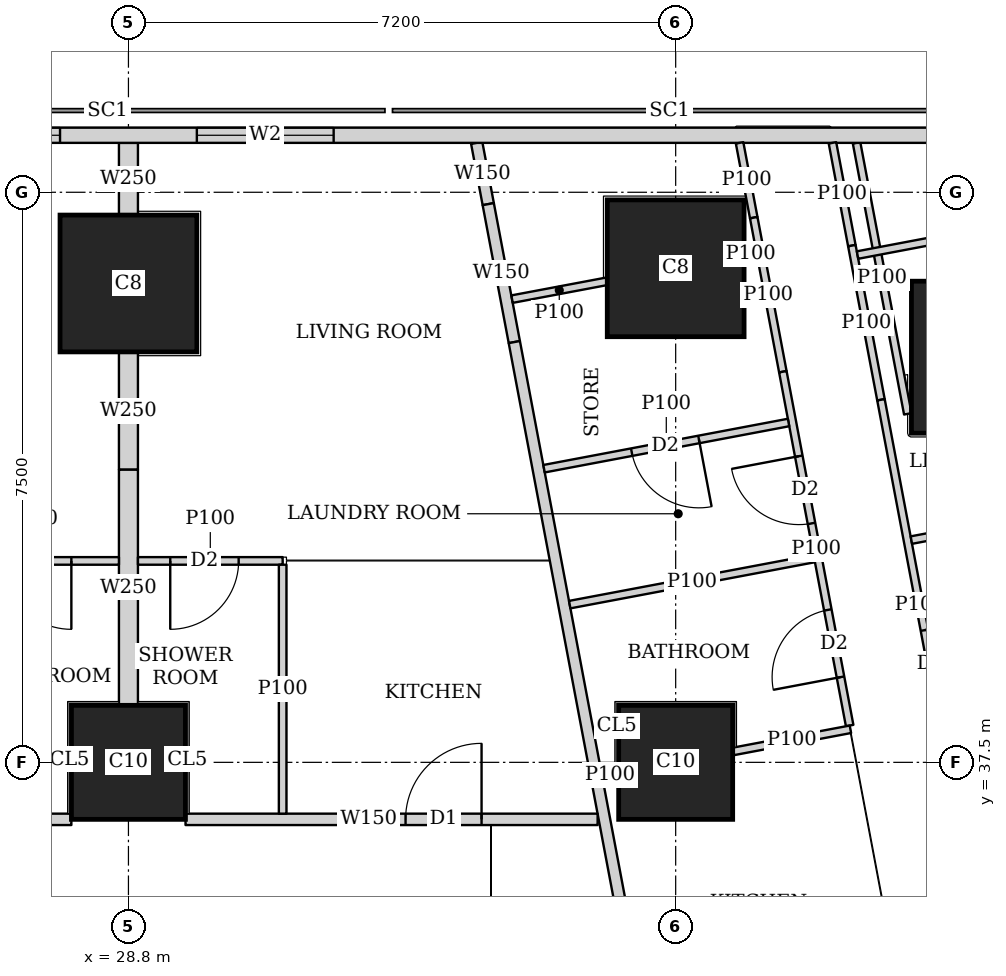
"""IFC4 building model, lengths in metres.
Left out: names, types, materials, properties, quantities, classifications, styles, units other than length and angle.
Written with IfcOpenShell. Run it as: python <this file> out.ifc"""

import sys

from ifc_helpers import new_model, si_unit, direction, frame, frame_2d, origin, origin_2d, place, context, subcontext, project, spatial, rectangle, extrude, element, fill, save


model = new_model("IFC4")
c1 = context("Model", 3, precision=1e-05, world=origin(), true_north=direction((0.0, 1.0)))
c2 = subcontext(c1, "Body", "Model", "MODEL_VIEW")
j1 = project(units=[si_unit("LENGTHUNIT", "METRE"), si_unit("PLANEANGLEUNIT", "RADIAN")], contexts=[c1])
p1 = place(None, origin())
s1 = spatial("IfcSite", under=j1, at=p1, CompositionType="ELEMENT")
p2 = place(p1, origin())
s2 = spatial("IfcBuilding", under=s1, at=p2, CompositionType="ELEMENT")
p3 = place(p2, frame((0.0, 0.0, 169.55)))
s3 = spatial("IfcBuildingStorey", under=s2, at=p3, CompositionType="ELEMENT", Elevation=169.55)
for number, where, z_axis, x_axis in (
    (1, (28.8, 37.5, 0.0), (0.0, 0.0, 1.0), (1.0, 0.0, 0.0)),
    (2, (36.0, 37.5, 0.0), (0.0, 0.0, 1.0), (1.0, 0.0, 0.0)),
):
    element("IfcColumn", number, at=place(p3, frame(where, z_axis=z_axis, x_axis=x_axis)), inside=s3, PredefinedType="COLUMN", context=c2, shape_type="SweptSolid", body=[
        extrude(rectangle(XDim=1.5, YDim=1.5, at=origin_2d()), origin(), (0.0, 0.0, 1.0), 3.75),
    ])
p4 = place(p3, frame((40.102, 42.83, 0.0), z_axis=(0.0, 0.0, 1.0), x_axis=(1.0, 0.0, 0.0)))
e3 = element("IfcColumn", 3, at=p4, inside=s3, PredefinedType="COLUMN", context=c2, shape_type="SweptSolid", body=[
    extrude(rectangle(XDim=2.0, YDim=2.0, at=origin_2d()), origin(), (0.0, 0.0, 1.0), 3.75),
])
for number, where, z_axis, x_axis in (
    (4, (28.8, 43.8, 0.0), (0.0, 0.0, 1.0), (1.0, 0.0, 0.0)),
    (5, (36.0, 44.0, 0.0), (0.0, 0.0, 1.0), (1.0, 0.0, 0.0)),
):
    element("IfcColumn", number, at=place(p3, frame(where, z_axis=z_axis, x_axis=x_axis)), inside=s3, PredefinedType="COLUMN", context=c2, shape_type="SweptSolid", body=[
        extrude(rectangle(XDim=1.8, YDim=1.8, at=origin_2d()), origin(), (0.0, 0.0, 1.0), 3.75),
    ])
p5 = place(p3, frame((40.106, 45.75, 0.0), z_axis=(0.0, 0.0, 1.0), x_axis=(-1.0, 0.0, 0.0)))
e6 = element("IfcWall", 6, at=p5, inside=s3, PredefinedType="SOLIDWALL", context=c2, shape_type="SweptSolid", body=[
    extrude(rectangle(XDim=37.943, YDim=0.2, at=frame_2d((18.971, 0.0))), origin(), (0.0, 0.0, 1.0), 3.5),
])
p6 = place(p5, frame((8.606, 0.0, 0.9)))
e7 = element("IfcOpeningElement", 7, at=p6, cuts=e6, PredefinedType="OPENING", context=c2, shape_type="SweptSolid", body=[
    extrude(rectangle(XDim=1.8, YDim=1.5, at=frame_2d((0.9, 0.75))), frame((0.0, 0.11, 0.0), z_axis=(0.0, -1.0, 0.0), x_axis=(1.0, 0.0, 0.0)), (0.0, 0.0, 1.0), 0.22),
])
p7 = place(p5, frame((12.206, 0.0, 0.9)))
e8 = element("IfcOpeningElement", 8, at=p7, cuts=e6, PredefinedType="OPENING", context=c2, shape_type="SweptSolid", body=[
    extrude(rectangle(XDim=1.8, YDim=1.5, at=frame_2d((0.9, 0.75))), frame((0.0, 0.11, 0.0), z_axis=(0.0, -1.0, 0.0), x_axis=(1.0, 0.0, 0.0)), (0.0, 0.0, 1.0), 0.22),
])
p8 = place(p5, frame((15.806, 0.0, 0.9)))
e9 = element("IfcOpeningElement", 9, at=p8, cuts=e6, PredefinedType="OPENING", context=c2, shape_type="SweptSolid", body=[
    extrude(rectangle(XDim=1.8, YDim=1.5, at=frame_2d((0.9, 0.75))), frame((0.0, 0.11, 0.0), z_axis=(0.0, -1.0, 0.0), x_axis=(1.0, 0.0, 0.0)), (0.0, 0.0, 1.0), 0.22),
])
p9 = place(p5, frame((19.406, 0.0, 0.9)))
e10 = element("IfcOpeningElement", 10, at=p9, cuts=e6, PredefinedType="OPENING", context=c2, shape_type="SweptSolid", body=[
    extrude(rectangle(XDim=1.8, YDim=1.5, at=frame_2d((0.9, 0.75))), frame((0.0, 0.11, 0.0), z_axis=(0.0, -1.0, 0.0), x_axis=(1.0, 0.0, 0.0)), (0.0, 0.0, 1.0), 0.22),
])
p10 = place(p5, frame((23.006, 0.0, 0.9)))
e11 = element("IfcOpeningElement", 11, at=p10, cuts=e6, PredefinedType="OPENING", context=c2, shape_type="SweptSolid", body=[
    extrude(rectangle(XDim=1.8, YDim=1.5, at=frame_2d((0.9, 0.75))), frame((0.0, 0.11, 0.0), z_axis=(0.0, -1.0, 0.0), x_axis=(1.0, 0.0, 0.0)), (0.0, 0.0, 1.0), 0.22),
])
p11 = place(p5, frame((26.606, 0.0, 0.9)))
e12 = element("IfcOpeningElement", 12, at=p11, cuts=e6, PredefinedType="OPENING", context=c2, shape_type="SweptSolid", body=[
    extrude(rectangle(XDim=1.8, YDim=1.5, at=frame_2d((0.9, 0.75))), frame((0.0, 0.11, 0.0), z_axis=(0.0, -1.0, 0.0), x_axis=(1.0, 0.0, 0.0)), (0.0, 0.0, 1.0), 0.22),
])
p12 = place(p3, frame((22.351, 36.75, 0.0), z_axis=(0.0, 0.0, 1.0), x_axis=(1.0, 0.0, 0.0)))
e13 = element("IfcWall", 13, at=p12, inside=s3, PredefinedType="SOLIDWALL", context=c2, shape_type="SweptSolid", body=[
    extrude(rectangle(XDim=5.698, YDim=0.15, at=frame_2d((2.849, 0.0))), origin(), (0.0, 0.0, 1.0), 3.5),
])
p13 = place(p12, frame((1.149, 0.0, 0.0)))
e14 = element("IfcOpeningElement", 14, at=p13, cuts=e13, PredefinedType="OPENING", context=c2, shape_type="SweptSolid", body=[
    extrude(rectangle(XDim=1.0, YDim=2.1, at=frame_2d((0.5, 1.05))), frame((0.0, 0.085, 0.0), z_axis=(0.0, -1.0, 0.0), x_axis=(1.0, 0.0, 0.0)), (0.0, 0.0, 1.0), 0.17),
])
p14 = place(p3, frame((29.551, 36.75, 0.0), z_axis=(0.0, 0.0, 1.0), x_axis=(1.0, 0.0, 0.0)))
e15 = element("IfcWall", 15, at=p14, inside=s3, PredefinedType="SOLIDWALL", context=c2, shape_type="SweptSolid", body=[
    extrude(rectangle(XDim=5.422, YDim=0.15, at=frame_2d((2.711, 0.0))), origin(), (0.0, 0.0, 1.0), 3.5),
])
p15 = place(p14, frame((2.895, 0.0, 0.0)))
e16 = element("IfcOpeningElement", 16, at=p15, cuts=e15, PredefinedType="OPENING", context=c2, shape_type="SweptSolid", body=[
    extrude(rectangle(XDim=1.0, YDim=2.1, at=frame_2d((0.5, 1.05))), frame((0.0, 0.085, 0.0), z_axis=(0.0, -1.0, 0.0), x_axis=(1.0, 0.0, 0.0)), (0.0, 0.0, 1.0), 0.17),
])
p16 = place(p3, frame((33.382, 45.65, 0.0), z_axis=(0.0, 0.0, 1.0), x_axis=(0.185169202764, -0.982706653253, 0.0)))
e17 = element("IfcWall", 17, at=p16, inside=s3, PredefinedType="SOLIDWALL", context=c2, shape_type="SweptSolid", body=[
    extrude(rectangle(XDim=0.82, YDim=0.15, at=frame_2d((0.41, 0.0))), origin(), (0.0, 0.0, 1.0), 3.5),
])
p17 = place(p3, frame((33.534, 44.844, 0.0), z_axis=(0.0, 0.0, 1.0), x_axis=(0.185708872674, -0.982604811005, 0.0)))
e18 = element("IfcWall", 18, at=p17, inside=s3, PredefinedType="SOLIDWALL", context=c2, shape_type="SweptSolid", body=[
    extrude(rectangle(XDim=1.847, YDim=0.15, at=frame_2d((0.924, 0.0))), origin(), (0.0, 0.0, 1.0), 2.1),
])
p18 = place(p3, frame((33.877, 43.029, 0.0), z_axis=(0.0, 0.0, 1.0), x_axis=(0.185596841028, -0.98262597798, 0.0)))
e19 = element("IfcWall", 19, at=p18, inside=s3, PredefinedType="SOLIDWALL", context=c2, shape_type="SweptSolid", body=[
    extrude(rectangle(XDim=41.66, YDim=0.15, at=frame_2d((20.83, 0.0))), origin(), (0.0, 0.0, 1.0), 2.5),
])
p19 = place(p18, frame((8.63, 0.0, 0.0)))
e20 = element("IfcOpeningElement", 20, at=p19, cuts=e19, PredefinedType="OPENING", context=c2, shape_type="SweptSolid", body=[
    extrude(rectangle(XDim=1.0, YDim=2.1, at=frame_2d((0.5, 1.05))), frame((0.0, 0.085, 0.0), z_axis=(0.0, -1.0, 0.0), x_axis=(1.0, 0.0, 0.0)), (0.0, 0.0, 1.0), 0.17),
])
p20 = place(p18, frame((13.841, 0.0, 0.0)))
e21 = element("IfcOpeningElement", 21, at=p20, cuts=e19, PredefinedType="OPENING", context=c2, shape_type="SweptSolid", body=[
    extrude(rectangle(XDim=1.0, YDim=2.1, at=frame_2d((0.5, 1.05))), frame((0.0, 0.085, 0.0), z_axis=(0.0, -1.0, 0.0), x_axis=(1.0, 0.0, 0.0)), (0.0, 0.0, 1.0), 0.17),
])
p21 = place(p18, frame((21.474, 0.0, 0.0)))
e22 = element("IfcOpeningElement", 22, at=p21, cuts=e19, PredefinedType="OPENING", context=c2, shape_type="SweptSolid", body=[
    extrude(rectangle(XDim=1.0, YDim=2.1, at=frame_2d((0.5, 1.05))), frame((0.0, 0.085, 0.0), z_axis=(0.0, -1.0, 0.0), x_axis=(1.0, 0.0, 0.0)), (0.0, 0.0, 1.0), 0.17),
])
p22 = place(p18, frame((30.4, 0.0, 0.0)))
e23 = element("IfcOpeningElement", 23, at=p22, cuts=e19, PredefinedType="OPENING", context=c2, shape_type="SweptSolid", body=[
    extrude(rectangle(XDim=1.0, YDim=2.1, at=frame_2d((0.5, 1.05))), frame((0.0, 0.085, 0.0), z_axis=(0.0, -1.0, 0.0), x_axis=(1.0, 0.0, 0.0)), (0.0, 0.0, 1.0), 0.17),
])
p23 = place(p18, frame((32.288, 0.0, 0.0)))
e24 = element("IfcOpeningElement", 24, at=p23, cuts=e19, PredefinedType="OPENING", context=c2, shape_type="SweptSolid", body=[
    extrude(rectangle(XDim=1.0, YDim=2.1, at=frame_2d((0.5, 1.05))), frame((0.0, 0.085, 0.0), z_axis=(0.0, -1.0, 0.0), x_axis=(1.0, 0.0, 0.0)), (0.0, 0.0, 1.0), 0.17),
])
p24 = place(p3, frame((39.054, 42.085, 0.0), z_axis=(0.0, 0.0, 1.0), x_axis=(-0.185791584218, 0.982589175207, 0.0)))
e25 = element("IfcWall", 25, at=p24, inside=s3, PredefinedType="PARTITIONING", context=c2, shape_type="SweptSolid", body=[
    extrude(rectangle(XDim=3.628, YDim=0.1, at=frame_2d((1.814, 0.0))), origin(), (0.0, 0.0, 1.0), 2.1),
])
p25 = place(p3, frame((38.063, 45.65, 0.0), z_axis=(0.0, 0.0, 1.0), x_axis=(0.185456359766, -0.982652501458, 0.0)))
e26 = element("IfcWall", 26, at=p25, inside=s3, PredefinedType="PARTITIONING", context=c2, shape_type="SweptSolid", body=[
    extrude(rectangle(XDim=1.376, YDim=0.1, at=frame_2d((0.688, 0.0))), origin(), (0.0, 0.0, 1.0), 3.5),
])
p26 = place(p3, frame((38.318, 44.298, 0.0), z_axis=(0.0, 0.0, 1.0), x_axis=(0.185481135188, -0.982647825261, 0.0)))
e27 = element("IfcWall", 27, at=p26, inside=s3, PredefinedType="PARTITIONING", context=c2, shape_type="SweptSolid", body=[
    extrude(rectangle(XDim=2.064, YDim=0.1, at=frame_2d((1.032, 0.0))), origin(), (0.0, 0.0, 1.0), 2.1),
])
p27 = place(p3, frame((38.701, 42.27, 0.0), z_axis=(0.0, 0.0, 1.0), x_axis=(0.185474244877, -0.982649125826, 0.0)))
e28 = element("IfcWall", 28, at=p27, inside=s3, PredefinedType="PARTITIONING", context=c2, shape_type="SweptSolid", body=[
    extrude(rectangle(XDim=5.494, YDim=0.1, at=frame_2d((2.747, 0.0))), origin(), (0.0, 0.0, 1.0), 3.5),
])
p28 = place(p27, frame((3.085, 0.0, 0.0)))
e29 = element("IfcOpeningElement", 29, at=p28, cuts=e28, PredefinedType="OPENING", context=c2, shape_type="SweptSolid", body=[
    extrude(rectangle(XDim=0.9, YDim=2.1, at=frame_2d((0.45, 1.05))), frame((0.0, 0.06, 0.0), z_axis=(0.0, -1.0, 0.0), x_axis=(1.0, 0.0, 0.0)), (0.0, 0.0, 1.0), 0.12),
])
p29 = place(p3, frame((36.841, 45.65, 0.0), z_axis=(0.0, 0.0, 1.0), x_axis=(0.185789875365, -0.982589498322, 0.0)))
e30 = element("IfcWall", 30, at=p29, inside=s3, PredefinedType="PARTITIONING", context=c2, shape_type="SweptSolid", body=[
    extrude(rectangle(XDim=1.001, YDim=0.1, at=frame_2d((0.5, 0.0))), origin(), (0.0, 0.0, 1.0), 3.5),
])
p30 = place(p3, frame((37.027, 44.666, 0.0), z_axis=(0.0, 0.0, 1.0), x_axis=(0.1855674151, -0.982631535446, 0.0)))
e31 = element("IfcWall", 31, at=p30, inside=s3, PredefinedType="PARTITIONING", context=c2, shape_type="SweptSolid", body=[
    extrude(rectangle(XDim=2.063, YDim=0.1, at=frame_2d((1.031, 0.0))), origin(), (0.0, 0.0, 1.0), 2.1),
])
p31 = place(p3, frame((37.41, 42.639, 0.0), z_axis=(0.0, 0.0, 1.0), x_axis=(0.185579683022, -0.982629218601, 0.0)))
e32 = element("IfcWall", 32, at=p31, inside=s3, PredefinedType="PARTITIONING", context=c2, shape_type="SweptSolid", body=[
    extrude(rectangle(XDim=4.737, YDim=0.1, at=frame_2d((2.369, 0.0))), origin(), (0.0, 0.0, 1.0), 3.5),
])
p32 = place(p31, frame((3.189, 0.0, 0.0)))
e33 = element("IfcOpeningElement", 33, at=p32, cuts=e32, PredefinedType="OPENING", context=c2, shape_type="SweptSolid", body=[
    extrude(rectangle(XDim=0.9, YDim=2.1, at=frame_2d((0.45, 1.05))), frame((0.0, 0.06, 0.0), z_axis=(0.0, -1.0, 0.0), x_axis=(1.0, 0.0, 0.0)), (0.0, 0.0, 1.0), 0.12),
])
p33 = place(p31, frame((1.131, 0.0, 0.0)))
e34 = element("IfcOpeningElement", 34, at=p33, cuts=e32, PredefinedType="OPENING", context=c2, shape_type="SweptSolid", body=[
    extrude(rectangle(XDim=0.9, YDim=2.1, at=frame_2d((0.45, 1.05))), frame((0.0, 0.06, 0.0), z_axis=(0.0, -1.0, 0.0), x_axis=(1.0, 0.0, 0.0)), (0.0, 0.0, 1.0), 0.12),
])
p34 = place(p3, frame((41.968, 44.85, 0.0), z_axis=(0.0, 0.0, 1.0), x_axis=(-0.98258614234, -0.185807623311, 0.0)))
e35 = element("IfcWall", 35, at=p34, inside=s3, PredefinedType="PARTITIONING", context=c2, shape_type="SweptSolid", body=[
    extrude(rectangle(XDim=3.638, YDim=0.1, at=frame_2d((1.819, 0.0))), origin(), (0.0, 0.0, 1.0), 2.1),
])
p35 = place(p3, frame((43.277, 41.212, 0.0), z_axis=(0.0, 0.0, 1.0), x_axis=(-0.982665405803, -0.185387972203, 0.0)))
e36 = element("IfcWall", 36, at=p35, inside=s3, PredefinedType="PARTITIONING", context=c2, shape_type="SweptSolid", body=[
    extrude(rectangle(XDim=4.25, YDim=0.1, at=frame_2d((2.125, 0.0))), origin(), (0.0, 0.0, 1.0), 2.1),
])
p36 = place(p3, frame((37.064, 44.201, 0.0), z_axis=(0.0, 0.0, 1.0), x_axis=(-0.982960250751, -0.183818240236, 0.0)))
e37 = element("IfcWall", 37, at=p36, inside=s3, PredefinedType="PARTITIONING", context=c2, shape_type="SweptSolid", body=[
    extrude(rectangle(XDim=0.157, YDim=0.1, at=frame_2d((0.078, 0.0))), origin(), (0.0, 0.0, 1.0), 2.1),
])
p37 = place(p3, frame((35.09, 43.828, 0.0), z_axis=(0.0, 0.0, 1.0), x_axis=(-0.982758384778, -0.184894448668, 0.0)))
e38 = element("IfcWall", 38, at=p37, inside=s3, PredefinedType="PARTITIONING", context=c2, shape_type="SweptSolid", body=[
    extrude(rectangle(XDim=1.265, YDim=0.1, at=frame_2d((0.632, 0.0))), origin(), (0.0, 0.0, 1.0), 2.1),
])
p38 = place(p3, frame((37.823, 40.182, 0.0), z_axis=(0.0, 0.0, 1.0), x_axis=(-0.982664729897, -0.18539155487, 0.0)))
e39 = element("IfcWall", 39, at=p38, inside=s3, PredefinedType="PARTITIONING", context=c2, shape_type="SweptSolid", body=[
    extrude(rectangle(XDim=3.274, YDim=0.1, at=frame_2d((1.637, 0.0))), origin(), (0.0, 0.0, 1.0), 3.5),
])
p39 = place(p3, frame((38.299, 37.935, 0.0), z_axis=(0.0, 0.0, 1.0), x_axis=(-0.98258870752, -0.18579405764, 0.0)))
e40 = element("IfcWall", 40, at=p39, inside=s3, PredefinedType="PARTITIONING", context=c2, shape_type="SweptSolid", body=[
    extrude(rectangle(XDim=1.566, YDim=0.1, at=frame_2d((0.783, 0.0))), origin(), (0.0, 0.0, 1.0), 3.5),
])
p40 = place(p3, frame((35.24, 37.356, 0.0), z_axis=(0.0, 0.0, 1.0), x_axis=(-0.982819911474, -0.184567119526, 0.0)))
e41 = element("IfcWall", 41, at=p40, inside=s3, PredefinedType="PARTITIONING", context=c2, shape_type="SweptSolid", body=[
    extrude(rectangle(XDim=0.212, YDim=0.1, at=frame_2d((0.106, 0.0))), origin(), (0.0, 0.0, 1.0), 3.5),
])
p41 = place(p3, frame((37.485, 41.971, 0.0), z_axis=(0.0, 0.0, 1.0), x_axis=(-0.982610347627, -0.185679575441, 0.0)))
e42 = element("IfcWall", 42, at=p41, inside=s3, PredefinedType="PARTITIONING", context=c2, shape_type="SweptSolid", body=[
    extrude(rectangle(XDim=3.274, YDim=0.1, at=frame_2d((1.637, 0.0))), origin(), (0.0, 0.0, 1.0), 3.5),
])
p42 = place(p41, frame((1.2, 0.0, 0.0)))
e43 = element("IfcOpeningElement", 43, at=p42, cuts=e42, PredefinedType="OPENING", context=c2, shape_type="SweptSolid", body=[
    extrude(rectangle(XDim=0.9, YDim=2.1, at=frame_2d((0.45, 1.05))), frame((0.0, 0.06, 0.0), z_axis=(0.0, -1.0, 0.0), x_axis=(1.0, 0.0, 0.0)), (0.0, 0.0, 1.0), 0.12),
])
p43 = place(p3, frame((26.399, 40.15, 0.0), z_axis=(0.0, 0.0, 1.0), x_axis=(1.0, 0.0, 0.0)))
e44 = element("IfcWall", 44, at=p43, inside=s3, PredefinedType="PARTITIONING", context=c2, shape_type="SweptSolid", body=[
    extrude(rectangle(XDim=2.276, YDim=0.1, at=frame_2d((1.138, 0.0))), origin(), (0.0, 0.0, 1.0), 3.5),
])
p44 = place(p43, frame((0.75, 0.0, 0.0)))
e45 = element("IfcOpeningElement", 45, at=p44, cuts=e44, PredefinedType="OPENING", context=c2, shape_type="SweptSolid", body=[
    extrude(rectangle(XDim=0.9, YDim=2.1, at=frame_2d((0.45, 1.05))), frame((0.0, 0.06, 0.0), z_axis=(0.0, -1.0, 0.0), x_axis=(1.0, 0.0, 0.0)), (0.0, 0.0, 1.0), 0.12),
])
p45 = place(p3, frame((28.925, 40.15, 0.0), z_axis=(0.0, 0.0, 1.0), x_axis=(1.0, 0.0, 0.0)))
e46 = element("IfcWall", 46, at=p45, inside=s3, PredefinedType="PARTITIONING", context=c2, shape_type="SweptSolid", body=[
    extrude(rectangle(XDim=1.904, YDim=0.1, at=frame_2d((0.952, 0.0))), origin(), (0.0, 0.0, 1.0), 3.5),
])
p46 = place(p45, frame((0.425, 0.0, 0.0)))
e47 = element("IfcOpeningElement", 47, at=p46, cuts=e46, PredefinedType="OPENING", context=c2, shape_type="SweptSolid", body=[
    extrude(rectangle(XDim=0.9, YDim=2.1, at=frame_2d((0.45, 1.05))), frame((0.0, 0.06, 0.0), z_axis=(0.0, -1.0, 0.0), x_axis=(1.0, 0.0, 0.0)), (0.0, 0.0, 1.0), 0.12),
])
p47 = place(p3, frame((30.829, 36.825, 0.0), z_axis=(0.0, 0.0, 1.0), x_axis=(0.0, 1.0, 0.0)))
e48 = element("IfcWall", 48, at=p47, inside=s3, PredefinedType="PARTITIONING", context=c2, shape_type="SweptSolid", body=[
    extrude(rectangle(XDim=3.275, YDim=0.1, at=frame_2d((1.638, 0.0))), origin(), (0.0, 0.0, 1.0), 3.5),
])
p48 = place(p3, frame((28.8, 41.35, 0.0), z_axis=(0.0, 0.0, 1.0), x_axis=(0.0, 1.0, 0.0)))
e49 = element("IfcWall", 49, at=p48, inside=s3, PredefinedType="SOLIDWALL", context=c2, shape_type="SweptSolid", body=[
    extrude(rectangle(XDim=1.549, YDim=0.25, at=frame_2d((0.774, 0.0))), origin(), (0.0, 0.0, 1.0), 2.1),
])
p49 = place(p3, frame((28.8, 44.701, 0.0), z_axis=(0.0, 0.0, 1.0), x_axis=(0.0, 1.0, 0.0)))
e50 = element("IfcWall", 50, at=p49, inside=s3, PredefinedType="SOLIDWALL", context=c2, shape_type="SweptSolid", body=[
    extrude(rectangle(XDim=0.949, YDim=0.25, at=frame_2d((0.475, 0.0))), origin(), (0.0, 0.0, 1.0), 2.1),
])
p50 = place(p3, frame((28.8, 38.251, 0.0), z_axis=(0.0, 0.0, 1.0), x_axis=(0.0, 1.0, 0.0)))
e51 = element("IfcWall", 51, at=p50, inside=s3, PredefinedType="SOLIDWALL", context=c2, shape_type="SweptSolid", body=[
    extrude(rectangle(XDim=3.099, YDim=0.25, at=frame_2d((1.55, 0.0))), origin(), (0.0, 0.0, 1.0), 3.5),
])
p51 = place(p6, origin())
e52 = element("IfcWindow", 52, at=p51, inside=s3, PartitioningType="SINGLE_PANEL", PredefinedType="WINDOW", context=c2, shape_type="SweptSolid", body=[
    extrude(rectangle(XDim=1.8, YDim=1.5, at=frame_2d((0.9, 0.75))), frame((0.0, 0.03, 0.0), z_axis=(0.0, -1.0, 0.0), x_axis=(1.0, 0.0, 0.0)), (0.0, 0.0, 1.0), 0.06),
])
fill(e7, e52)
p52 = place(p7, origin())
e53 = element("IfcWindow", 53, at=p52, inside=s3, PartitioningType="SINGLE_PANEL", PredefinedType="WINDOW", context=c2, shape_type="SweptSolid", body=[
    extrude(rectangle(XDim=1.8, YDim=1.5, at=frame_2d((0.9, 0.75))), frame((0.0, 0.03, 0.0), z_axis=(0.0, -1.0, 0.0), x_axis=(1.0, 0.0, 0.0)), (0.0, 0.0, 1.0), 0.06),
])
fill(e8, e53)
p53 = place(p28, origin())
e54 = element("IfcDoor", 54, at=p53, inside=s3, OperationType="SINGLE_SWING_LEFT", PredefinedType="DOOR", context=c2, shape_type="SweptSolid", body=[
    extrude(rectangle(XDim=0.9, YDim=2.1, at=frame_2d((0.45, 1.05))), frame((0.0, 0.025, 0.0), z_axis=(0.0, -1.0, 0.0), x_axis=(1.0, 0.0, 0.0)), (0.0, 0.0, 1.0), 0.05),
])
fill(e29, e54)
p54 = place(p32, origin())
e55 = element("IfcDoor", 55, at=p54, inside=s3, OperationType="SINGLE_SWING_LEFT", PredefinedType="DOOR", context=c2, shape_type="SweptSolid", body=[
    extrude(rectangle(XDim=0.9, YDim=2.1, at=frame_2d((0.45, 1.05))), frame((0.0, 0.025, 0.0), z_axis=(0.0, -1.0, 0.0), x_axis=(1.0, 0.0, 0.0)), (0.0, 0.0, 1.0), 0.05),
])
fill(e33, e55)
p55 = place(p33, origin())
e56 = element("IfcDoor", 56, at=p55, inside=s3, OperationType="SINGLE_SWING_RIGHT", PredefinedType="DOOR", context=c2, shape_type="SweptSolid", body=[
    extrude(rectangle(XDim=0.9, YDim=2.1, at=frame_2d((0.45, 1.05))), frame((0.0, 0.025, 0.0), z_axis=(0.0, -1.0, 0.0), x_axis=(1.0, 0.0, 0.0)), (0.0, 0.0, 1.0), 0.05),
])
fill(e34, e56)
p56 = place(p42, origin())
e57 = element("IfcDoor", 57, at=p56, inside=s3, OperationType="SINGLE_SWING_LEFT", PredefinedType="DOOR", context=c2, shape_type="SweptSolid", body=[
    extrude(rectangle(XDim=0.9, YDim=2.1, at=frame_2d((0.45, 1.05))), frame((0.0, 0.025, 0.0), z_axis=(0.0, -1.0, 0.0), x_axis=(1.0, 0.0, 0.0)), (0.0, 0.0, 1.0), 0.05),
])
fill(e43, e57)
p57 = place(p44, origin())
e58 = element("IfcDoor", 58, at=p57, inside=s3, OperationType="SINGLE_SWING_LEFT", PredefinedType="DOOR", context=c2, shape_type="SweptSolid", body=[
    extrude(rectangle(XDim=0.9, YDim=2.1, at=frame_2d((0.45, 1.05))), frame((0.0, 0.025, 0.0), z_axis=(0.0, -1.0, 0.0), x_axis=(1.0, 0.0, 0.0)), (0.0, 0.0, 1.0), 0.05),
])
fill(e45, e58)
p58 = place(p46, origin())
e59 = element("IfcDoor", 59, at=p58, inside=s3, OperationType="SINGLE_SWING_RIGHT", PredefinedType="DOOR", context=c2, shape_type="SweptSolid", body=[
    extrude(rectangle(XDim=0.9, YDim=2.1, at=frame_2d((0.45, 1.05))), frame((0.0, 0.025, 0.0), z_axis=(0.0, -1.0, 0.0), x_axis=(1.0, 0.0, 0.0)), (0.0, 0.0, 1.0), 0.05),
])
fill(e47, e59)
p59 = place(p15, origin())
e60 = element("IfcDoor", 60, at=p59, inside=s3, OperationType="SINGLE_SWING_RIGHT", PredefinedType="DOOR", context=c2, shape_type="SweptSolid", body=[
    extrude(rectangle(XDim=1.0, YDim=2.1, at=frame_2d((0.5, 1.05))), frame((0.0, 0.025, 0.0), z_axis=(0.0, -1.0, 0.0), x_axis=(1.0, 0.0, 0.0)), (0.0, 0.0, 1.0), 0.05),
])
fill(e16, e60)
save(model, sys.argv[1])
